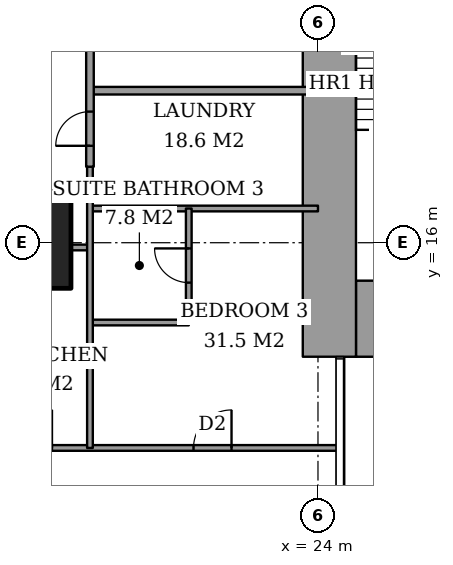
"""IFC4 building model, lengths in metres.
Left out: names, types, materials, properties, quantities, classifications, styles, units other than length and angle.
Written with IfcOpenShell. Run it as: python <this file> out.ifc"""

import sys

from ifc_helpers import new_model, si_unit, direction, frame, frame_2d, origin, origin_2d, place, context, subcontext, project, spatial, rectangle, extrude, element, fill, save


model = new_model("IFC4")
c1 = context("Model", 3, precision=1e-05, world=origin(), true_north=direction((0.0, 1.0)))
c2 = subcontext(c1, "Body", "Model", "MODEL_VIEW")
j1 = project(units=[si_unit("LENGTHUNIT", "METRE"), si_unit("PLANEANGLEUNIT", "RADIAN")], contexts=[c1])
p1 = place(None, origin())
s1 = spatial("IfcSite", under=j1, at=p1, CompositionType="ELEMENT")
p2 = place(p1, origin())
s2 = spatial("IfcBuilding", under=s1, at=p2, CompositionType="ELEMENT")
p3 = place(p2, frame((0.0, 0.0, 161.0)))
s3 = spatial("IfcBuildingStorey", under=s2, at=p3, CompositionType="ELEMENT", Elevation=161.0)
p4 = place(p3, frame((16.0, 16.0, 0.0), z_axis=(0.0, 0.0, 1.0), x_axis=(1.0, 0.0, 0.0)))
e1 = element("IfcColumn", 1, at=p4, inside=s3, PredefinedType="COLUMN", context=c2, shape_type="SweptSolid", body=[
    extrude(rectangle(XDim=3.0, YDim=2.4, at=origin_2d()), origin(), (0.0, 0.0, 1.0), 3.6),
])
p5 = place(p3, frame((25.0, 14.0, 0.0), z_axis=(0.0, 0.0, 1.0), x_axis=(1.0, 0.0, 0.0)))
e2 = element("IfcWall", 2, at=p5, inside=s3, PredefinedType="SHEAR", context=c2, shape_type="SweptSolid", body=[
    extrude(rectangle(XDim=3.15, YDim=2.0, at=frame_2d((1.575, 0.0))), origin(), (0.0, 0.0, 1.0), 3.6),
])
p6 = place(p3, frame((24.3, 13.0, 0.0), z_axis=(0.0, 0.0, 1.0), x_axis=(0.0, 1.0, 0.0)))
e3 = element("IfcWall", 3, at=p6, inside=s3, PredefinedType="SHEAR", context=c2, shape_type="SweptSolid", body=[
    extrude(rectangle(XDim=10.15, YDim=1.4, at=frame_2d((5.075, 0.0))), origin(), (0.0, 0.0, 1.0), 3.6),
])
p7 = place(p3, frame((-0.45, 10.6, 0.0), z_axis=(0.0, 0.0, 1.0), x_axis=(1.0, 0.0, 0.0)))
e4 = element("IfcWall", 4, at=p7, inside=s3, PredefinedType="PARTITIONING", context=c2, shape_type="SweptSolid", body=[
    extrude(rectangle(XDim=25.011, YDim=0.15, at=frame_2d((12.505, 0.0))), origin(), (0.0, 0.0, 1.0), 3.35),
])
p8 = place(p7, frame((10.65, 0.0, 0.0)))
e5 = element("IfcOpeningElement", 5, at=p8, cuts=e4, PredefinedType="OPENING", context=c2, shape_type="SweptSolid", body=[
    extrude(rectangle(XDim=1.0, YDim=2.1, at=frame_2d((0.5, 1.05))), frame((0.0, 0.085, 0.0), z_axis=(0.0, -1.0, 0.0), x_axis=(1.0, 0.0, 0.0)), (0.0, 0.0, 1.0), 0.17),
])
p9 = place(p7, frame((3.087, 0.0, 0.0)))
e6 = element("IfcOpeningElement", 6, at=p9, cuts=e4, PredefinedType="OPENING", context=c2, shape_type="SweptSolid", body=[
    extrude(rectangle(XDim=1.0, YDim=2.1, at=frame_2d((0.5, 1.05))), frame((0.0, 0.085, 0.0), z_axis=(0.0, -1.0, 0.0), x_axis=(1.0, 0.0, 0.0)), (0.0, 0.0, 1.0), 0.17),
])
p10 = place(p7, frame((8.163, 0.0, 0.0)))
e7 = element("IfcOpeningElement", 7, at=p10, cuts=e4, PredefinedType="OPENING", context=c2, shape_type="SweptSolid", body=[
    extrude(rectangle(XDim=0.9, YDim=2.1, at=frame_2d((0.45, 1.05))), frame((0.0, 0.085, 0.0), z_axis=(0.0, -1.0, 0.0), x_axis=(1.0, 0.0, 0.0)), (0.0, 0.0, 1.0), 0.17),
])
p11 = place(p7, frame((13.35, 0.0, 0.0)))
e8 = element("IfcOpeningElement", 8, at=p11, cuts=e4, PredefinedType="OPENING", context=c2, shape_type="SweptSolid", body=[
    extrude(rectangle(XDim=1.0, YDim=2.1, at=frame_2d((0.5, 1.05))), frame((0.0, 0.085, 0.0), z_axis=(0.0, -1.0, 0.0), x_axis=(1.0, 0.0, 0.0)), (0.0, 0.0, 1.0), 0.17),
])
p12 = place(p7, frame((16.45, 0.0, 0.0)))
e9 = element("IfcOpeningElement", 9, at=p12, cuts=e4, PredefinedType="OPENING", context=c2, shape_type="SweptSolid", body=[
    extrude(rectangle(XDim=1.0, YDim=2.1, at=frame_2d((0.5, 1.05))), frame((0.0, 0.085, 0.0), z_axis=(0.0, -1.0, 0.0), x_axis=(1.0, 0.0, 0.0)), (0.0, 0.0, 1.0), 0.17),
])
p13 = place(p7, frame((21.175, 0.0, 0.0)))
e10 = element("IfcOpeningElement", 10, at=p13, cuts=e4, PredefinedType="OPENING", context=c2, shape_type="SweptSolid", body=[
    extrude(rectangle(XDim=1.0, YDim=2.1, at=frame_2d((0.5, 1.05))), frame((0.0, 0.085, 0.0), z_axis=(0.0, -1.0, 0.0), x_axis=(1.0, 0.0, 0.0)), (0.0, 0.0, 1.0), 0.17),
])
p14 = place(p3, frame((18.0, 13.9, 0.0), z_axis=(0.0, 0.0, 1.0), x_axis=(1.0, 0.0, 0.0)))
e11 = element("IfcWall", 11, at=p14, inside=s3, PredefinedType="PARTITIONING", context=c2, shape_type="SweptSolid", body=[
    extrude(rectangle(XDim=2.6, YDim=0.15, at=frame_2d((1.3, 0.0))), origin(), (0.0, 0.0, 1.0), 3.35),
])
p15 = place(p3, frame((17.5, 15.875, 0.0), z_axis=(0.0, 0.0, 1.0), x_axis=(1.0, 0.0, 0.0)))
e12 = element("IfcWall", 12, at=p15, inside=s3, PredefinedType="PARTITIONING", context=c2, shape_type="SweptSolid", body=[
    extrude(rectangle(XDim=0.5, YDim=0.15, at=frame_2d((0.25, 0.0))), origin(), (0.0, 0.0, 1.0), 2.634),
])
p16 = place(p3, frame((18.0, 16.9, 0.0), z_axis=(0.0, 0.0, 1.0), x_axis=(1.0, 0.0, 0.0)))
e13 = element("IfcWall", 13, at=p16, inside=s3, PredefinedType="PARTITIONING", context=c2, shape_type="SweptSolid", body=[
    extrude(rectangle(XDim=6.0, YDim=0.15, at=frame_2d((3.0, 0.0))), origin(), (0.0, 0.0, 1.0), 3.35),
])
p17 = place(p3, frame((18.0, 20.0, 0.0), z_axis=(0.0, 0.0, 1.0), x_axis=(1.0, 0.0, 0.0)))
e14 = element("IfcWall", 14, at=p17, inside=s3, PredefinedType="PARTITIONING", context=c2, shape_type="SweptSolid", body=[
    extrude(rectangle(XDim=6.0, YDim=0.2, at=frame_2d((3.0, 0.0))), origin(), (0.0, 0.0, 1.0), 3.35),
])
p18 = place(p3, frame((18.0, 18.0, 0.0), z_axis=(0.0, 0.0, 1.0), x_axis=(0.0, 1.0, 0.0)))
e15 = element("IfcWall", 15, at=p18, inside=s3, PredefinedType="PARTITIONING", context=c2, shape_type="SweptSolid", body=[
    extrude(rectangle(XDim=6.0, YDim=0.2, at=frame_2d((3.0, 0.0))), origin(), (0.0, 0.0, 1.0), 3.35),
])
p19 = place(p18, frame((3.4, 0.0, 0.0)))
e16 = element("IfcOpeningElement", 16, at=p19, cuts=e15, PredefinedType="OPENING", context=c2, shape_type="SweptSolid", body=[
    extrude(rectangle(XDim=1.2, YDim=2.4, at=frame_2d((0.6, 1.2))), frame((0.0, 0.11, 0.0), z_axis=(0.0, -1.0, 0.0), x_axis=(1.0, 0.0, 0.0)), (0.0, 0.0, 1.0), 0.22),
])
p20 = place(p18, frame((0.55, 0.0, 0.0)))
e17 = element("IfcOpeningElement", 17, at=p20, cuts=e15, PredefinedType="OPENING", context=c2, shape_type="SweptSolid", body=[
    extrude(rectangle(XDim=0.9, YDim=2.1, at=frame_2d((0.45, 1.05))), frame((0.0, 0.11, 0.0), z_axis=(0.0, -1.0, 0.0), x_axis=(1.0, 0.0, 0.0)), (0.0, 0.0, 1.0), 0.22),
])
p21 = place(p3, frame((18.0, 10.6, 0.0), z_axis=(0.0, 0.0, 1.0), x_axis=(0.0, 1.0, 0.0)))
e18 = element("IfcWall", 18, at=p21, inside=s3, PredefinedType="PARTITIONING", context=c2, shape_type="SweptSolid", body=[
    extrude(rectangle(XDim=7.4, YDim=0.15, at=frame_2d((3.7, 0.0))), origin(), (0.0, 0.0, 1.0), 3.35),
])
p22 = place(p3, frame((20.6, 13.9, 0.0), z_axis=(0.0, 0.0, 1.0), x_axis=(0.0, 1.0, 0.0)))
e19 = element("IfcWall", 19, at=p22, inside=s3, PredefinedType="PARTITIONING", context=c2, shape_type="SweptSolid", body=[
    extrude(rectangle(XDim=3.0, YDim=0.15, at=frame_2d((1.5, 0.0))), origin(), (0.0, 0.0, 1.0), 3.35),
])
p23 = place(p22, frame((1.05, 0.0, 0.0)))
e20 = element("IfcOpeningElement", 20, at=p23, cuts=e19, PredefinedType="OPENING", context=c2, shape_type="SweptSolid", body=[
    extrude(rectangle(XDim=0.9, YDim=2.1, at=frame_2d((0.45, 1.05))), frame((0.0, 0.085, 0.0), z_axis=(0.0, -1.0, 0.0), x_axis=(1.0, 0.0, 0.0)), (0.0, 0.0, 1.0), 0.17),
])
p24 = place(p23, origin())
e21 = element("IfcDoor", 21, at=p24, inside=s3, OperationType="SINGLE_SWING_LEFT", PredefinedType="DOOR", context=c2, shape_type="SweptSolid", body=[
    extrude(rectangle(XDim=0.9, YDim=2.1, at=frame_2d((0.45, 1.05))), frame((0.0, 0.025, 0.0), z_axis=(0.0, -1.0, 0.0), x_axis=(1.0, 0.0, 0.0)), (0.0, 0.0, 1.0), 0.05),
])
fill(e20, e21)
p25 = place(p13, origin())
e22 = element("IfcDoor", 22, at=p25, inside=s3, OperationType="SINGLE_SWING_LEFT", PredefinedType="DOOR", context=c2, shape_type="SweptSolid", body=[
    extrude(rectangle(XDim=1.0, YDim=2.1, at=frame_2d((0.5, 1.05))), frame((0.0, 0.025, 0.0), z_axis=(0.0, -1.0, 0.0), x_axis=(1.0, 0.0, 0.0)), (0.0, 0.0, 1.0), 0.05),
])
fill(e10, e22)
p26 = place(p20, origin())
e23 = element("IfcDoor", 23, at=p26, inside=s3, OperationType="SINGLE_SWING_RIGHT", PredefinedType="DOOR", context=c2, shape_type="SweptSolid", body=[
    extrude(rectangle(XDim=0.9, YDim=2.1, at=frame_2d((0.45, 1.05))), frame((0.0, 0.025, 0.0), z_axis=(0.0, -1.0, 0.0), x_axis=(1.0, 0.0, 0.0)), (0.0, 0.0, 1.0), 0.05),
])
fill(e17, e23)
save(model, sys.argv[1])
